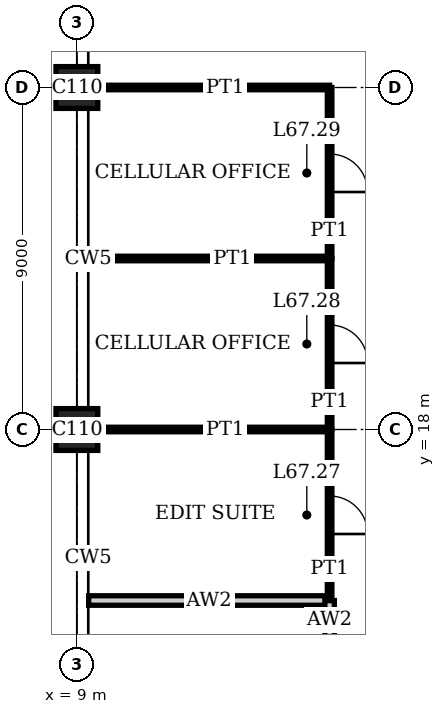
"""IFC4 building model, lengths in metres.
Left out: names, types, materials, properties, quantities, classifications, styles, units other than length and angle.
Written with IfcOpenShell. Run it as: python <this file> out.ifc"""

import sys

from ifc_helpers import new_model, si_unit, direction, frame, frame_2d, origin, origin_2d, place, context, subcontext, project, spatial, rectangle, extrude, element, fill, save


model = new_model("IFC4")
c1 = context("Model", 3, precision=1e-05, world=origin(), true_north=direction((0.0, 1.0)))
c2 = subcontext(c1, "Body", "Model", "MODEL_VIEW")
j1 = project(units=[si_unit("LENGTHUNIT", "METRE"), si_unit("PLANEANGLEUNIT", "RADIAN")], contexts=[c1])
p1 = place(None, origin())
s1 = spatial("IfcSite", under=j1, at=p1, CompositionType="ELEMENT")
p2 = place(p1, origin())
s2 = spatial("IfcBuilding", under=s1, at=p2, CompositionType="ELEMENT")
p3 = place(p2, frame((0.0, 0.0, 275.4)))
s3 = spatial("IfcBuildingStorey", under=s2, at=p3, CompositionType="ELEMENT", Elevation=275.4)
for number, where, z_axis, x_axis in (
    (1, (9.0, 18.0, 0.0), (0.0, 0.0, 1.0), (1.0, 0.0, 0.0)),
    (2, (9.0, 27.0, 0.0), (0.0, 0.0, 1.0), (1.0, 0.0, 0.0)),
):
    element("IfcColumn", number, at=place(p3, frame(where, z_axis=z_axis, x_axis=x_axis)), inside=s3, PredefinedType="COLUMN", context=c2, shape_type="SweptSolid", body=[
        extrude(rectangle(XDim=1.1, YDim=1.1, at=origin_2d()), origin(), (0.0, 0.0, 1.0), 4.0),
    ])
p4 = place(p3, frame((9.31, 13.5, 0.0), z_axis=(0.0, 0.0, 1.0), x_axis=(1.0, 0.0, 0.0)))
e3 = element("IfcWall", 3, at=p4, inside=s3, PredefinedType="PARTITIONING", context=c2, shape_type="SweptSolid", body=[
    extrude(rectangle(XDim=6.34, YDim=0.25, at=frame_2d((3.17, 0.0))), origin(), (0.0, 0.0, 1.0), 3.1),
])
p5 = place(p3, frame((9.55, 18.0, 0.0), z_axis=(0.0, 0.0, 1.0), x_axis=(1.0, 0.0, 0.0)))
e4 = element("IfcWall", 4, at=p5, inside=s3, PredefinedType="PARTITIONING", context=c2, shape_type="SweptSolid", body=[
    extrude(rectangle(XDim=6.1, YDim=0.12, at=frame_2d((3.05, 0.0))), origin(), (0.0, 0.0, 1.0), 3.05),
])
p6 = place(p3, frame((9.31, 22.5, 0.0), z_axis=(0.0, 0.0, 1.0), x_axis=(1.0, 0.0, 0.0)))
e5 = element("IfcWall", 5, at=p6, inside=s3, PredefinedType="PARTITIONING", context=c2, shape_type="SweptSolid", body=[
    extrude(rectangle(XDim=6.34, YDim=0.12, at=frame_2d((3.17, 0.0))), origin(), (0.0, 0.0, 1.0), 3.1),
])
p7 = place(p3, frame((9.55, 27.0, 0.0), z_axis=(0.0, 0.0, 1.0), x_axis=(1.0, 0.0, 0.0)))
e6 = element("IfcWall", 6, at=p7, inside=s3, PredefinedType="PARTITIONING", context=c2, shape_type="SweptSolid", body=[
    extrude(rectangle(XDim=6.1, YDim=0.12, at=frame_2d((3.05, 0.0))), origin(), (0.0, 0.0, 1.0), 3.05),
])
p8 = place(p3, frame((15.65, 9.0, 0.0), z_axis=(0.0, 0.0, 1.0), x_axis=(0.0, 1.0, 0.0)))
e7 = element("IfcWall", 7, at=p8, inside=s3, PredefinedType="PARTITIONING", context=c2, shape_type="SweptSolid", body=[
    extrude(rectangle(XDim=4.5, YDim=0.25, at=frame_2d((2.25, 0.0))), origin(), (0.0, 0.0, 1.0), 3.75),
])
p9 = place(p8, frame((1.35, 0.0, 0.0)))
e8 = element("IfcOpeningElement", 8, at=p9, cuts=e7, PredefinedType="OPENING", context=c2, shape_type="SweptSolid", body=[
    extrude(rectangle(XDim=1.8, YDim=2.4, at=frame_2d((0.9, 1.2))), frame((0.0, 0.135, 0.0), z_axis=(0.0, -1.0, 0.0), x_axis=(1.0, 0.0, 0.0)), (0.0, 0.0, 1.0), 0.27),
])
p10 = place(p3, frame((15.65, 13.5, 0.0), z_axis=(0.0, 0.0, 1.0), x_axis=(0.0, 1.0, 0.0)))
e9 = element("IfcWall", 9, at=p10, inside=s3, PredefinedType="PARTITIONING", context=c2, shape_type="SweptSolid", body=[
    extrude(rectangle(XDim=4.5, YDim=0.12, at=frame_2d((2.25, 0.0))), origin(), (0.0, 0.0, 1.0), 3.75),
])
p11 = place(p10, frame((1.75, 0.0, 0.0)))
e10 = element("IfcOpeningElement", 10, at=p11, cuts=e9, PredefinedType="OPENING", context=c2, shape_type="SweptSolid", body=[
    extrude(rectangle(XDim=1.0, YDim=2.4, at=frame_2d((0.5, 1.2))), frame((0.0, 0.07, 0.0), z_axis=(0.0, -1.0, 0.0), x_axis=(1.0, 0.0, 0.0)), (0.0, 0.0, 1.0), 0.14),
])
p12 = place(p3, frame((15.65, 18.0, 0.0), z_axis=(0.0, 0.0, 1.0), x_axis=(0.0, 1.0, 0.0)))
e11 = element("IfcWall", 11, at=p12, inside=s3, PredefinedType="PARTITIONING", context=c2, shape_type="SweptSolid", body=[
    extrude(rectangle(XDim=4.5, YDim=0.12, at=frame_2d((2.25, 0.0))), origin(), (0.0, 0.0, 1.0), 3.75),
])
p13 = place(p12, frame((1.75, 0.0, 0.0)))
e12 = element("IfcOpeningElement", 12, at=p13, cuts=e11, PredefinedType="OPENING", context=c2, shape_type="SweptSolid", body=[
    extrude(rectangle(XDim=1.0, YDim=2.4, at=frame_2d((0.5, 1.2))), frame((0.0, 0.07, 0.0), z_axis=(0.0, -1.0, 0.0), x_axis=(1.0, 0.0, 0.0)), (0.0, 0.0, 1.0), 0.14),
])
p14 = place(p3, frame((15.65, 22.5, 0.0), z_axis=(0.0, 0.0, 1.0), x_axis=(0.0, 1.0, 0.0)))
e13 = element("IfcWall", 13, at=p14, inside=s3, PredefinedType="PARTITIONING", context=c2, shape_type="SweptSolid", body=[
    extrude(rectangle(XDim=4.5, YDim=0.12, at=frame_2d((2.25, 0.0))), origin(), (0.0, 0.0, 1.0), 3.75),
])
p15 = place(p14, frame((1.75, 0.0, 0.0)))
e14 = element("IfcOpeningElement", 14, at=p15, cuts=e13, PredefinedType="OPENING", context=c2, shape_type="SweptSolid", body=[
    extrude(rectangle(XDim=1.0, YDim=2.4, at=frame_2d((0.5, 1.2))), frame((0.0, 0.07, 0.0), z_axis=(0.0, -1.0, 0.0), x_axis=(1.0, 0.0, 0.0)), (0.0, 0.0, 1.0), 0.14),
])
p16 = place(p11, origin())
e15 = element("IfcDoor", 15, at=p16, inside=s3, OperationType="SINGLE_SWING_LEFT", PredefinedType="DOOR", context=c2, shape_type="SweptSolid", body=[
    extrude(rectangle(XDim=1.0, YDim=2.4, at=frame_2d((0.5, 1.2))), frame((0.0, 0.025, 0.0), z_axis=(0.0, -1.0, 0.0), x_axis=(1.0, 0.0, 0.0)), (0.0, 0.0, 1.0), 0.05),
])
fill(e10, e15)
p17 = place(p13, origin())
e16 = element("IfcDoor", 16, at=p17, inside=s3, OperationType="SINGLE_SWING_LEFT", PredefinedType="DOOR", context=c2, shape_type="SweptSolid", body=[
    extrude(rectangle(XDim=1.0, YDim=2.4, at=frame_2d((0.5, 1.2))), frame((0.0, 0.025, 0.0), z_axis=(0.0, -1.0, 0.0), x_axis=(1.0, 0.0, 0.0)), (0.0, 0.0, 1.0), 0.05),
])
fill(e12, e16)
p18 = place(p15, origin())
e17 = element("IfcDoor", 17, at=p18, inside=s3, OperationType="SINGLE_SWING_LEFT", PredefinedType="DOOR", context=c2, shape_type="SweptSolid", body=[
    extrude(rectangle(XDim=1.0, YDim=2.4, at=frame_2d((0.5, 1.2))), frame((0.0, 0.025, 0.0), z_axis=(0.0, -1.0, 0.0), x_axis=(1.0, 0.0, 0.0)), (0.0, 0.0, 1.0), 0.05),
])
fill(e14, e17)
save(model, sys.argv[1])
